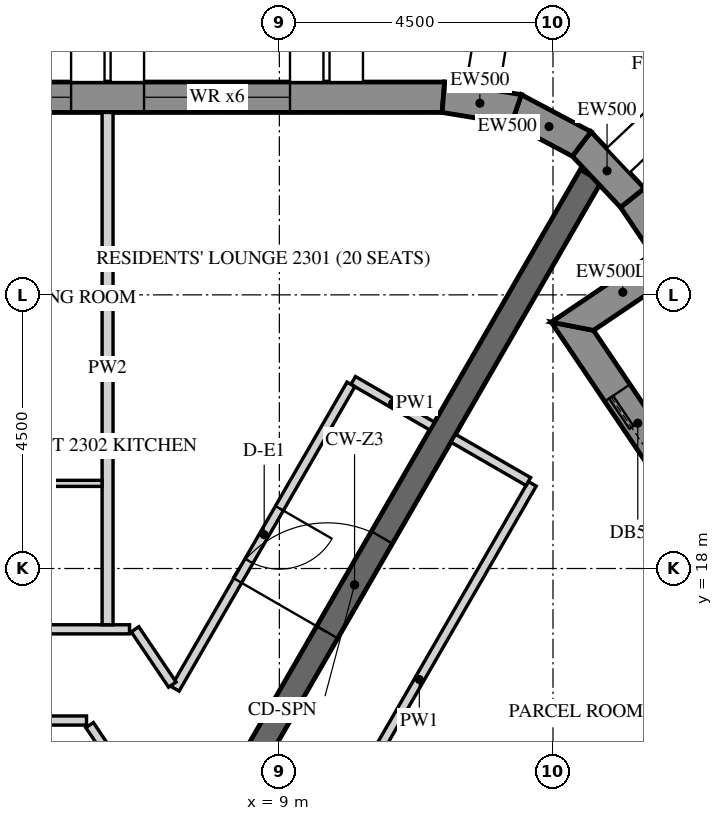
"""IFC4 building model, lengths in metres.
Left out: names, types, materials, properties, quantities, classifications, styles, units other than length and angle.
Written with IfcOpenShell. Run it as: python <this file> out.ifc"""

import sys

from ifc_helpers import new_model, si_unit, direction, frame, frame_2d, origin, place, context, subcontext, project, spatial, polyline, rectangle, outline, extrude, element, fill, save


model = new_model("IFC4")
c1 = context("Model", 3, precision=1e-05, world=origin(), true_north=direction((0.0, 1.0)))
c2 = subcontext(c1, "Body", "Model", "MODEL_VIEW")
j1 = project(units=[si_unit("LENGTHUNIT", "METRE"), si_unit("PLANEANGLEUNIT", "RADIAN")], contexts=[c1])
p1 = place(None, origin())
s1 = spatial("IfcSite", under=j1, at=p1, CompositionType="ELEMENT")
p2 = place(p1, origin())
s2 = spatial("IfcBuilding", under=s1, at=p2, CompositionType="ELEMENT")
p3 = place(p2, frame((0.0, 0.0, 291.3)))
s3 = spatial("IfcBuildingStorey", under=s2, at=p3, CompositionType="ELEMENT", Elevation=291.3)
p4 = place(p3, frame((11.698, 25.75, -0.15), z_axis=(0.0, 0.0, 1.0), x_axis=(-1.0, 0.0, 0.0)))
e1 = element("IfcWall", 1, at=p4, inside=s3, PredefinedType="SOLIDWALL", context=c2, shape_type="SweptSolid", body=[
    extrude(outline(polyline([(-0.021, -0.25), (25.468, -0.25), (25.421, 0.25), (0.021, 0.25), (-0.021, -0.25)])), origin(), (0.0, 0.0, 1.0), 3.9),
])
p5 = place(p4, frame((2.522, 0.0, 0.75)))
e2 = element("IfcOpeningElement", 2, at=p5, cuts=e1, PredefinedType="OPENING", context=c2, shape_type="SweptSolid", body=[
    extrude(rectangle(XDim=2.4, YDim=2.7, at=frame_2d((1.2, 1.35))), frame((0.0, 0.26, 0.0), z_axis=(0.0, -1.0, 0.0), x_axis=(1.0, 0.0, 0.0)), (0.0, 0.0, 1.0), 0.52),
])
p6 = place(p4, frame((6.122, 0.0, 0.75)))
e3 = element("IfcOpeningElement", 3, at=p6, cuts=e1, PredefinedType="OPENING", context=c2, shape_type="SweptSolid", body=[
    extrude(rectangle(XDim=2.4, YDim=2.7, at=frame_2d((1.2, 1.35))), frame((0.0, 0.26, 0.0), z_axis=(0.0, -1.0, 0.0), x_axis=(1.0, 0.0, 0.0)), (0.0, 0.0, 1.0), 0.52),
])
p7 = place(p4, frame((9.722, 0.0, 0.75)))
e4 = element("IfcOpeningElement", 4, at=p7, cuts=e1, PredefinedType="OPENING", context=c2, shape_type="SweptSolid", body=[
    extrude(rectangle(XDim=2.4, YDim=2.7, at=frame_2d((1.2, 1.35))), frame((0.0, 0.26, 0.0), z_axis=(0.0, -1.0, 0.0), x_axis=(1.0, 0.0, 0.0)), (0.0, 0.0, 1.0), 0.52),
])
p8 = place(p4, frame((13.323, 0.0, 0.75)))
e5 = element("IfcOpeningElement", 5, at=p8, cuts=e1, PredefinedType="OPENING", context=c2, shape_type="SweptSolid", body=[
    extrude(rectangle(XDim=2.4, YDim=2.7, at=frame_2d((1.2, 1.35))), frame((0.0, 0.26, 0.0), z_axis=(0.0, -1.0, 0.0), x_axis=(1.0, 0.0, 0.0)), (0.0, 0.0, 1.0), 0.52),
])
p9 = place(p4, frame((16.922, 0.0, 0.75)))
e6 = element("IfcOpeningElement", 6, at=p9, cuts=e1, PredefinedType="OPENING", context=c2, shape_type="SweptSolid", body=[
    extrude(rectangle(XDim=2.4, YDim=2.7, at=frame_2d((1.2, 1.35))), frame((0.0, 0.26, 0.0), z_axis=(0.0, -1.0, 0.0), x_axis=(1.0, 0.0, 0.0)), (0.0, 0.0, 1.0), 0.52),
])
p10 = place(p4, frame((20.522, 0.0, 0.75)))
e7 = element("IfcOpeningElement", 7, at=p10, cuts=e1, PredefinedType="OPENING", context=c2, shape_type="SweptSolid", body=[
    extrude(rectangle(XDim=2.4, YDim=2.7, at=frame_2d((1.2, 1.35))), frame((0.0, 0.26, 0.0), z_axis=(0.0, -1.0, 0.0), x_axis=(1.0, 0.0, 0.0)), (0.0, 0.0, 1.0), 0.52),
])
p11 = place(p3, frame((26.706, 2.879, -0.15), z_axis=(0.0, 0.0, 1.0), x_axis=(-0.559197891507, 0.829034208061, 0.0)))
e8 = element("IfcWall", 8, at=p11, inside=s3, PredefinedType="SOLIDWALL", context=c2, shape_type="SweptSolid", body=[
    extrude(outline(polyline([(0.25, -0.25), (22.795, -0.25), (23.295, 0.25), (-0.25, 0.25), (0.25, -0.25)])), origin(), (0.0, 0.0, 1.0), 3.9),
])
p12 = place(p11, frame((1.323, 0.0, 1.05)))
e9 = element("IfcOpeningElement", 9, at=p12, cuts=e8, PredefinedType="OPENING", context=c2, shape_type="SweptSolid", body=[
    extrude(rectangle(XDim=0.9, YDim=1.5, at=frame_2d((0.45, 0.75))), frame((0.0, 0.26, 0.0), z_axis=(0.0, -1.0, 0.0), x_axis=(1.0, 0.0, 0.0)), (0.0, 0.0, 1.0), 0.52),
])
p13 = place(p11, frame((2.522, 0.0, 0.15)))
e10 = element("IfcOpeningElement", 10, at=p13, cuts=e8, PredefinedType="OPENING", context=c2, shape_type="SweptSolid", body=[
    extrude(rectangle(XDim=1.2, YDim=2.4, at=frame_2d((0.6, 1.2))), frame((0.0, 0.26, 0.0), z_axis=(0.0, -1.0, 0.0), x_axis=(1.0, 0.0, 0.0)), (0.0, 0.0, 1.0), 0.52),
])
p14 = place(p11, frame((4.922, 0.0, 1.05)))
e11 = element("IfcOpeningElement", 11, at=p14, cuts=e8, PredefinedType="OPENING", context=c2, shape_type="SweptSolid", body=[
    extrude(rectangle(XDim=0.9, YDim=1.5, at=frame_2d((0.45, 0.75))), frame((0.0, 0.26, 0.0), z_axis=(0.0, -1.0, 0.0), x_axis=(1.0, 0.0, 0.0)), (0.0, 0.0, 1.0), 0.52),
])
p15 = place(p11, frame((6.122, 0.0, 0.15)))
e12 = element("IfcOpeningElement", 12, at=p15, cuts=e8, PredefinedType="OPENING", context=c2, shape_type="SweptSolid", body=[
    extrude(rectangle(XDim=1.2, YDim=2.4, at=frame_2d((0.6, 1.2))), frame((0.0, 0.26, 0.0), z_axis=(0.0, -1.0, 0.0), x_axis=(1.0, 0.0, 0.0)), (0.0, 0.0, 1.0), 0.52),
])
p16 = place(p11, frame((8.522, 0.0, 1.05)))
e13 = element("IfcOpeningElement", 13, at=p16, cuts=e8, PredefinedType="OPENING", context=c2, shape_type="SweptSolid", body=[
    extrude(rectangle(XDim=0.9, YDim=1.5, at=frame_2d((0.45, 0.75))), frame((0.0, 0.26, 0.0), z_axis=(0.0, -1.0, 0.0), x_axis=(1.0, 0.0, 0.0)), (0.0, 0.0, 1.0), 0.52),
])
p17 = place(p11, frame((9.722, 0.0, 0.15)))
e14 = element("IfcOpeningElement", 14, at=p17, cuts=e8, PredefinedType="OPENING", context=c2, shape_type="SweptSolid", body=[
    extrude(rectangle(XDim=1.2, YDim=2.4, at=frame_2d((0.6, 1.2))), frame((0.0, 0.26, 0.0), z_axis=(0.0, -1.0, 0.0), x_axis=(1.0, 0.0, 0.0)), (0.0, 0.0, 1.0), 0.52),
])
p18 = place(p11, frame((12.122, 0.0, 1.05)))
e15 = element("IfcOpeningElement", 15, at=p18, cuts=e8, PredefinedType="OPENING", context=c2, shape_type="SweptSolid", body=[
    extrude(rectangle(XDim=0.9, YDim=1.5, at=frame_2d((0.45, 0.75))), frame((0.0, 0.26, 0.0), z_axis=(0.0, -1.0, 0.0), x_axis=(1.0, 0.0, 0.0)), (0.0, 0.0, 1.0), 0.52),
])
p19 = place(p11, frame((13.323, 0.0, 0.15)))
e16 = element("IfcOpeningElement", 16, at=p19, cuts=e8, PredefinedType="OPENING", context=c2, shape_type="SweptSolid", body=[
    extrude(rectangle(XDim=1.2, YDim=2.4, at=frame_2d((0.6, 1.2))), frame((0.0, 0.26, 0.0), z_axis=(0.0, -1.0, 0.0), x_axis=(1.0, 0.0, 0.0)), (0.0, 0.0, 1.0), 0.52),
])
p20 = place(p11, frame((15.722, 0.0, 1.05)))
e17 = element("IfcOpeningElement", 17, at=p20, cuts=e8, PredefinedType="OPENING", context=c2, shape_type="SweptSolid", body=[
    extrude(rectangle(XDim=0.9, YDim=1.5, at=frame_2d((0.45, 0.75))), frame((0.0, 0.26, 0.0), z_axis=(0.0, -1.0, 0.0), x_axis=(1.0, 0.0, 0.0)), (0.0, 0.0, 1.0), 0.52),
])
p21 = place(p11, frame((16.922, 0.0, 0.15)))
e18 = element("IfcOpeningElement", 18, at=p21, cuts=e8, PredefinedType="OPENING", context=c2, shape_type="SweptSolid", body=[
    extrude(rectangle(XDim=1.2, YDim=2.4, at=frame_2d((0.6, 1.2))), frame((0.0, 0.26, 0.0), z_axis=(0.0, -1.0, 0.0), x_axis=(1.0, 0.0, 0.0)), (0.0, 0.0, 1.0), 0.52),
])
p22 = place(p11, frame((19.323, 0.0, 1.05)))
e19 = element("IfcOpeningElement", 19, at=p22, cuts=e8, PredefinedType="OPENING", context=c2, shape_type="SweptSolid", body=[
    extrude(rectangle(XDim=0.9, YDim=1.5, at=frame_2d((0.45, 0.75))), frame((0.0, 0.26, 0.0), z_axis=(0.0, -1.0, 0.0), x_axis=(1.0, 0.0, 0.0)), (0.0, 0.0, 1.0), 0.52),
])
p23 = place(p11, frame((20.522, 0.0, 0.15)))
e20 = element("IfcOpeningElement", 20, at=p23, cuts=e8, PredefinedType="OPENING", context=c2, shape_type="SweptSolid", body=[
    extrude(rectangle(XDim=1.2, YDim=2.4, at=frame_2d((0.6, 1.2))), frame((0.0, 0.26, 0.0), z_axis=(0.0, -1.0, 0.0), x_axis=(1.0, 0.0, 0.0)), (0.0, 0.0, 1.0), 0.52),
])
p24 = place(p3, frame((13.819, 21.984, -0.15), z_axis=(0.0, 0.0, 1.0), x_axis=(0.829052389485, 0.559170935841, 0.0)))
e21 = element("IfcWall", 21, at=p24, inside=s3, PredefinedType="SOLIDWALL", context=c2, shape_type="SweptSolid", body=[
    extrude(outline(polyline([(0.25, -0.25), (2.25, -0.25), (1.75, 0.25), (-0.25, 0.25), (0.25, -0.25)])), origin(), (0.0, 0.0, 1.0), 3.9),
])
p25 = place(p3, frame((15.478, 23.102, -0.15), z_axis=(0.0, 0.0, 1.0), x_axis=(-0.559245726333, 0.829001940636, 0.0)))
e22 = element("IfcWall", 22, at=p25, inside=s3, PredefinedType="SOLIDWALL", context=c2, shape_type="SweptSolid", body=[
    extrude(outline(polyline([(-0.25, -0.25), (1.221, -0.25), (1.18, 0.25), (0.25, 0.25), (-0.25, -0.25)])), origin(), (0.0, 0.0, 1.0), 3.9),
])
p26 = place(p3, frame((14.806, 24.097, -0.15), z_axis=(0.0, 0.0, 1.0), x_axis=(-0.686234452793, 0.727380420275, 0.0)))
e23 = element("IfcWall", 23, at=p26, inside=s3, PredefinedType="SOLIDWALL", context=c2, shape_type="SweptSolid", body=[
    extrude(outline(polyline([(-0.021, -0.25), (1.257, -0.25), (1.175, 0.25), (0.021, 0.25), (-0.021, -0.25)])), origin(), (0.0, 0.0, 1.0), 3.9),
])
p27 = place(p3, frame((13.972, 24.982, -0.15), z_axis=(0.0, 0.0, 1.0), x_axis=(-0.882902492938, 0.469556373575, 0.0)))
e24 = element("IfcWall", 24, at=p27, inside=s3, PredefinedType="SOLIDWALL", context=c2, shape_type="SweptSolid", body=[
    extrude(outline(polyline([(-0.041, -0.25), (1.257, -0.25), (1.175, 0.25), (0.041, 0.25), (-0.041, -0.25)])), origin(), (0.0, 0.0, 1.0), 3.9),
])
p28 = place(p3, frame((12.898, 25.553, -0.15), z_axis=(0.0, 0.0, 1.0), x_axis=(-0.986765617372, 0.16215306464, 0.0)))
e25 = element("IfcWall", 25, at=p28, inside=s3, PredefinedType="SOLIDWALL", context=c2, shape_type="SweptSolid", body=[
    extrude(outline(polyline([(-0.041, -0.25), (1.237, -0.25), (1.196, 0.25), (0.041, 0.25), (-0.041, -0.25)])), origin(), (0.0, 0.0, 1.0), 3.9),
])
p29 = place(p3, frame((6.351, 11.0, -0.15), z_axis=(0.0, 0.0, 1.0), x_axis=(0.499998894578, 0.866026041999, 0.0)))
e26 = element("IfcWall", 26, at=p29, inside=s3, PredefinedType="SHEAR", context=c2, shape_type="SweptSolid", body=[
    extrude(rectangle(XDim=15.544, YDim=0.4, at=frame_2d((7.772, 0.0))), origin(), (0.0, 0.0, 1.0), 3.9),
])
p30 = place(p29, frame((6.872, 0.0, 0.15)))
e27 = element("IfcOpeningElement", 27, at=p30, cuts=e26, PredefinedType="OPENING", context=c2, shape_type="SweptSolid", body=[
    extrude(rectangle(XDim=1.8, YDim=2.4, at=frame_2d((0.9, 1.2))), frame((0.0, 0.21, 0.0), z_axis=(0.0, -1.0, 0.0), x_axis=(1.0, 0.0, 0.0)), (0.0, 0.0, 1.0), 0.42),
])
p31 = place(p3, frame((11.514, 20.343, 0.0), z_axis=(0.0, 0.0, 1.0), x_axis=(-0.866031096941, 0.499990139034, 0.0)))
e28 = element("IfcWall", 28, at=p31, inside=s3, PredefinedType="PARTITIONING", context=c2, shape_type="SweptSolid", body=[
    extrude(rectangle(XDim=1.5, YDim=0.15, at=frame_2d((0.75, 0.0))), origin(), (0.0, 0.0, 1.0), 2.988),
])
p32 = place(p3, frame((10.177, 21.027, 0.0), z_axis=(0.0, 0.0, 1.0), x_axis=(-0.500013707032, -0.866017489881, 0.0)))
e29 = element("IfcWall", 29, at=p32, inside=s3, PredefinedType="PARTITIONING", context=c2, shape_type="SweptSolid", body=[
    extrude(rectangle(XDim=5.781, YDim=0.15, at=frame_2d((2.89, 0.0))), origin(), (0.0, 0.0, 1.0), 2.988),
])
p33 = place(p32, frame((2.353, 0.0, 0.0)))
e30 = element("IfcOpeningElement", 30, at=p33, cuts=e29, PredefinedType="OPENING", context=c2, shape_type="SweptSolid", body=[
    extrude(rectangle(XDim=1.0, YDim=2.1, at=frame_2d((0.5, 1.05))), frame((0.0, 0.085, 0.0), z_axis=(0.0, -1.0, 0.0), x_axis=(1.0, 0.0, 0.0)), (0.0, 0.0, 1.0), 0.17),
])
p34 = place(p3, frame((7.24, 16.09, 0.0), z_axis=(0.0, 0.0, 1.0), x_axis=(-0.559159452146, 0.829060134777, 0.0)))
e31 = element("IfcWall", 31, at=p34, inside=s3, PredefinedType="PARTITIONING", context=c2, shape_type="SweptSolid", body=[
    extrude(rectangle(XDim=1.097, YDim=0.15, at=frame_2d((0.549, 0.0))), origin(), (0.0, 0.0, 1.0), 2.988),
])
p35 = place(p3, frame((6.536, 17.0, 0.0), z_axis=(0.0, 0.0, 1.0), x_axis=(-1.0, 0.0, 0.0)))
e32 = element("IfcWall", 32, at=p35, inside=s3, PredefinedType="PARTITIONING", context=c2, shape_type="SweptSolid", body=[
    extrude(rectangle(XDim=14.934, YDim=0.15, at=frame_2d((7.467, 0.0))), origin(), (0.0, 0.0, 1.0), 2.988),
])
p36 = place(p35, frame((3.661, 0.0, 0.0)))
e33 = element("IfcOpeningElement", 33, at=p36, cuts=e32, PredefinedType="OPENING", context=c2, shape_type="SweptSolid", body=[
    extrude(rectangle(XDim=1.0, YDim=2.1, at=frame_2d((0.5, 1.05))), frame((0.0, 0.085, 0.0), z_axis=(0.0, -1.0, 0.0), x_axis=(1.0, 0.0, 0.0)), (0.0, 0.0, 1.0), 0.17),
])
p37 = place(p35, frame((9.961, 0.0, 0.0)))
e34 = element("IfcOpeningElement", 34, at=p37, cuts=e32, PredefinedType="OPENING", context=c2, shape_type="SweptSolid", body=[
    extrude(rectangle(XDim=1.0, YDim=2.1, at=frame_2d((0.5, 1.05))), frame((0.0, 0.085, 0.0), z_axis=(0.0, -1.0, 0.0), x_axis=(1.0, 0.0, 0.0)), (0.0, 0.0, 1.0), 0.17),
])
p38 = place(p3, frame((-7.377, 15.5, 0.0), z_axis=(0.0, 0.0, 1.0), x_axis=(1.0, 0.0, 0.0)))
e35 = element("IfcWall", 35, at=p38, inside=s3, PredefinedType="PARTITIONING", context=c2, shape_type="SweptSolid", body=[
    extrude(rectangle(XDim=13.206, YDim=0.15, at=frame_2d((6.603, 0.0))), origin(), (0.0, 0.0, 1.0), 2.988),
])
p39 = place(p38, frame((6.153, 0.0, 0.0)))
e36 = element("IfcOpeningElement", 36, at=p39, cuts=e35, PredefinedType="OPENING", context=c2, shape_type="SweptSolid", body=[
    extrude(rectangle(XDim=0.9, YDim=2.1, at=frame_2d((0.45, 1.05))), frame((0.0, 0.085, 0.0), z_axis=(0.0, -1.0, 0.0), x_axis=(1.0, 0.0, 0.0)), (0.0, 0.0, 1.0), 0.17),
])
p40 = place(p3, frame((5.88, 15.425, 0.0), z_axis=(0.0, 0.0, 1.0), x_axis=(0.559202631314, -0.829031010959, 0.0)))
e37 = element("IfcWall", 37, at=p40, inside=s3, PredefinedType="PARTITIONING", context=c2, shape_type="SweptSolid", body=[
    extrude(rectangle(XDim=1.024, YDim=0.15, at=frame_2d((0.512, 0.0))), origin(), (0.0, 0.0, 1.0), 2.988),
])
p41 = place(p3, frame((9.444, 12.957, 0.0), z_axis=(0.0, 0.0, 1.0), x_axis=(0.500004967958, 0.866022535513, 0.0)))
e38 = element("IfcWall", 38, at=p41, inside=s3, PredefinedType="PARTITIONING", context=c2, shape_type="SweptSolid", body=[
    extrude(rectangle(XDim=7.431, YDim=0.15, at=frame_2d((3.715, 0.0))), origin(), (0.0, 0.0, 1.0), 2.988),
])
p42 = place(p41, frame((0.15, 0.0, 0.0)))
e39 = element("IfcOpeningElement", 39, at=p42, cuts=e38, PredefinedType="OPENING", context=c2, shape_type="SweptSolid", body=[
    extrude(rectangle(XDim=1.0, YDim=2.1, at=frame_2d((0.5, 1.05))), frame((0.0, 0.085, 0.0), z_axis=(0.0, -1.0, 0.0), x_axis=(1.0, 0.0, 0.0)), (0.0, 0.0, 1.0), 0.17),
])
p43 = place(p3, frame((13.094, 19.43, 0.0), z_axis=(0.0, 0.0, 1.0), x_axis=(-0.866062911188, 0.499935029643, 0.0)))
e40 = element("IfcWall", 40, at=p43, inside=s3, PredefinedType="PARTITIONING", context=c2, shape_type="SweptSolid", body=[
    extrude(rectangle(XDim=1.425, YDim=0.15, at=frame_2d((0.712, 0.0))), origin(), (0.0, 0.0, 1.0), 2.988),
])
p44 = place(p3, frame((6.175, 25.5, 0.0), z_axis=(0.0, 0.0, 1.0), x_axis=(0.0, -1.0, 0.0)))
e41 = element("IfcWall", 41, at=p44, inside=s3, PredefinedType="PARTITIONING", context=c2, shape_type="SweptSolid", body=[
    extrude(rectangle(XDim=8.425, YDim=0.18, at=frame_2d((4.212, 0.0))), origin(), (0.0, 0.0, 1.0), 2.988),
])
p45 = place(p3, frame((3.825, 19.4, 0.0), z_axis=(0.0, 0.0, 1.0), x_axis=(1.0, 0.0, 0.0)))
e42 = element("IfcWall", 42, at=p45, inside=s3, PredefinedType="PARTITIONING", context=c2, shape_type="SweptSolid", body=[
    extrude(rectangle(XDim=2.26, YDim=0.1, at=frame_2d((1.13, 0.0))), origin(), (0.0, 0.0, 1.0), 2.988),
])
p46 = place(p3, frame((18.042, 15.276, 0.0), z_axis=(0.0, 0.0, 1.0), x_axis=(-0.829037762759, -0.559192621481, 0.0)))
e43 = element("IfcWall", 43, at=p46, inside=s3, PredefinedType="PARTITIONING", context=c2, shape_type="SweptSolid", body=[
    extrude(rectangle(XDim=8.425, YDim=0.18, at=frame_2d((4.212, 0.0))), origin(), (0.0, 0.0, 1.0), 2.988),
])
p47 = place(p5, frame((0.0, 0.18, 0.0)))
e44 = element("IfcWindow", 44, at=p47, inside=s3, PartitioningType="DOUBLE_PANEL_VERTICAL", PredefinedType="WINDOW", context=c2, shape_type="SweptSolid", body=[
    extrude(rectangle(XDim=2.4, YDim=2.7, at=frame_2d((1.2, 1.35))), frame((0.0, 0.03, 0.0), z_axis=(0.0, -1.0, 0.0), x_axis=(1.0, 0.0, 0.0)), (0.0, 0.0, 1.0), 0.06),
])
fill(e2, e44)
p48 = place(p6, frame((0.0, 0.18, 0.0)))
e45 = element("IfcWindow", 45, at=p48, inside=s3, PartitioningType="DOUBLE_PANEL_VERTICAL", PredefinedType="WINDOW", context=c2, shape_type="SweptSolid", body=[
    extrude(rectangle(XDim=2.4, YDim=2.7, at=frame_2d((1.2, 1.35))), frame((0.0, 0.03, 0.0), z_axis=(0.0, -1.0, 0.0), x_axis=(1.0, 0.0, 0.0)), (0.0, 0.0, 1.0), 0.06),
])
fill(e3, e45)
p49 = place(p23, frame((0.0, 0.175, 0.0)))
e46 = element("IfcDoor", 46, at=p49, inside=s3, OperationType="SLIDING_TO_LEFT", PredefinedType="DOOR", context=c2, shape_type="SweptSolid", body=[
    extrude(rectangle(XDim=1.2, YDim=2.4, at=frame_2d((0.6, 1.2))), frame((0.0, 0.025, 0.0), z_axis=(0.0, -1.0, 0.0), x_axis=(1.0, 0.0, 0.0)), (0.0, 0.0, 1.0), 0.05),
])
fill(e20, e46)
p50 = place(p30, origin())
e47 = element("IfcDoor", 47, at=p50, inside=s3, OperationType="DOUBLE_DOOR_SINGLE_SWING", PredefinedType="DOOR", context=c2, shape_type="SweptSolid", body=[
    extrude(rectangle(XDim=1.8, YDim=2.4, at=frame_2d((0.9, 1.2))), frame((0.0, 0.025, 0.0), z_axis=(0.0, -1.0, 0.0), x_axis=(1.0, 0.0, 0.0)), (0.0, 0.0, 1.0), 0.05),
])
fill(e27, e47)
p51 = place(p33, origin())
e48 = element("IfcDoor", 48, at=p51, inside=s3, OperationType="SINGLE_SWING_RIGHT", PredefinedType="DOOR", context=c2, shape_type="SweptSolid", body=[
    extrude(rectangle(XDim=1.0, YDim=2.1, at=frame_2d((0.5, 1.05))), frame((0.0, 0.025, 0.0), z_axis=(0.0, -1.0, 0.0), x_axis=(1.0, 0.0, 0.0)), (0.0, 0.0, 1.0), 0.05),
])
fill(e30, e48)
save(model, sys.argv[1])
